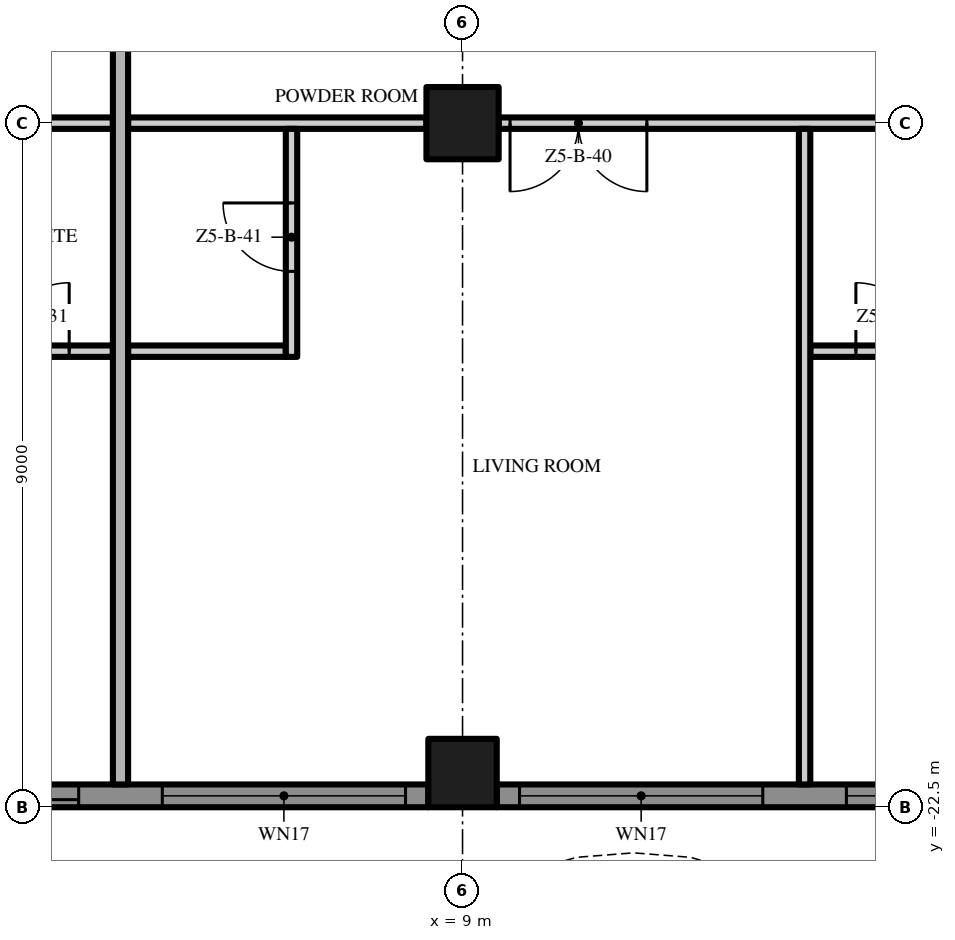
"""IFC4 building model, lengths in metres.
Left out: names, types, materials, properties, quantities, classifications, styles, units other than length and angle.
Written with IfcOpenShell. Run it as: python <this file> out.ifc"""

import sys

from ifc_helpers import new_model, si_unit, direction, frame, frame_2d, origin, origin_2d, place, context, subcontext, project, spatial, polyline, rectangle, outline, extrude, element, fill, save


model = new_model("IFC4")
c1 = context("Model", 3, precision=1e-05, world=origin(), true_north=direction((0.0, 1.0)))
c2 = subcontext(c1, "Body", "Model", "MODEL_VIEW")
j1 = project(units=[si_unit("LENGTHUNIT", "METRE"), si_unit("PLANEANGLEUNIT", "RADIAN")], contexts=[c1])
p1 = place(None, origin())
s1 = spatial("IfcSite", under=j1, at=p1, CompositionType="ELEMENT")
p2 = place(p1, origin())
s2 = spatial("IfcBuilding", under=s1, at=p2, CompositionType="ELEMENT")
p3 = place(p2, frame((0.0, 0.0, 257.8)))
s3 = spatial("IfcBuildingStorey", under=s2, at=p3, CompositionType="ELEMENT", Elevation=257.8)
p4 = place(p3, frame((9.0, -13.5, 0.0), z_axis=(0.0, 0.0, 1.0), x_axis=(1.0, 0.0, 0.0)))
e1 = element("IfcColumn", 1, at=p4, inside=s3, PredefinedType="COLUMN", context=c2, shape_type="SweptSolid", body=[
    extrude(rectangle(XDim=0.95, YDim=0.95, at=origin_2d()), origin(), (0.0, 0.0, 1.0), 3.5),
])
p5 = place(p3, frame((9.0, -22.05, 0.0), z_axis=(0.0, 0.0, 1.0), x_axis=(1.0, 0.0, 0.0)))
e2 = element("IfcColumn", 2, at=p5, inside=s3, PredefinedType="COLUMN", context=c2, shape_type="SweptSolid", body=[
    extrude(rectangle(XDim=0.9, YDim=0.9, at=origin_2d()), origin(), (0.0, 0.0, 1.0), 3.5),
])
p6 = place(p3, frame((8.55, -22.35, 0.0), z_axis=(0.0, 0.0, 1.0), x_axis=(-1.0, 0.0, 0.0)))
e3 = element("IfcWall", 3, at=p6, inside=s3, PredefinedType="SOLIDWALL", context=c2, shape_type="SweptSolid", body=[
    extrude(rectangle(XDim=8.1, YDim=0.3, at=frame_2d((4.05, 0.0))), origin(), (0.0, 0.0, 1.0), 3.5),
])
p7 = place(p6, frame((4.6, 0.0, 0.0)))
e4 = element("IfcOpeningElement", 4, at=p7, cuts=e3, PredefinedType="OPENING", context=c2, shape_type="SweptSolid", body=[
    extrude(rectangle(XDim=3.2, YDim=2.4, at=frame_2d((1.6, 1.2))), frame((0.0, 0.16, 0.0), z_axis=(0.0, -1.0, 0.0), x_axis=(1.0, 0.0, 0.0)), (0.0, 0.0, 1.0), 0.32),
])
p8 = place(p6, frame((0.3, 0.0, 0.45)))
e5 = element("IfcOpeningElement", 5, at=p8, cuts=e3, PredefinedType="OPENING", context=c2, shape_type="SweptSolid", body=[
    extrude(rectangle(XDim=3.2, YDim=2.65, at=frame_2d((1.6, 1.325))), frame((0.0, 0.16, 0.0), z_axis=(0.0, -1.0, 0.0), x_axis=(1.0, 0.0, 0.0)), (0.0, 0.0, 1.0), 0.32),
])
p9 = place(p3, frame((17.55, -22.35, 0.0), z_axis=(0.0, 0.0, 1.0), x_axis=(-1.0, 0.0, 0.0)))
e6 = element("IfcWall", 6, at=p9, inside=s3, PredefinedType="SOLIDWALL", context=c2, shape_type="SweptSolid", body=[
    extrude(rectangle(XDim=8.1, YDim=0.3, at=frame_2d((4.05, 0.0))), origin(), (0.0, 0.0, 1.0), 3.5),
])
p10 = place(p9, frame((4.6, 0.0, 0.45)))
e7 = element("IfcOpeningElement", 7, at=p10, cuts=e6, PredefinedType="OPENING", context=c2, shape_type="SweptSolid", body=[
    extrude(rectangle(XDim=3.2, YDim=2.65, at=frame_2d((1.6, 1.325))), frame((0.0, 0.16, 0.0), z_axis=(0.0, -1.0, 0.0), x_axis=(1.0, 0.0, 0.0)), (0.0, 0.0, 1.0), 0.32),
])
p11 = place(p9, frame((0.3, 0.0, 0.45)))
e8 = element("IfcOpeningElement", 8, at=p11, cuts=e6, PredefinedType="OPENING", context=c2, shape_type="SweptSolid", body=[
    extrude(rectangle(XDim=3.2, YDim=2.65, at=frame_2d((1.6, 1.325))), frame((0.0, 0.16, 0.0), z_axis=(0.0, -1.0, 0.0), x_axis=(1.0, 0.0, 0.0)), (0.0, 0.0, 1.0), 0.32),
])
p12 = place(p3, origin())
e9 = element("IfcWall", 9, at=p12, inside=s3, PredefinedType="USERDEFINED", context=c2, shape_type="SweptSolid", body=[
    extrude(outline(polyline([(-22.5, -24.3), (-21.0, -23.595), (-19.5, -23.159), (-18.75, -23.1), (-18.0, -23.159), (-16.5, -23.595), (-15.0, -24.3), (-13.5, -25.005), (-12.0, -25.441), (-11.25, -25.5), (-10.5, -25.441), (-9.0, -25.005), (-7.5, -24.3), (-6.0, -23.595), (-4.5, -23.159), (-3.75, -23.1), (-3.0, -23.159), (-1.5, -23.595), (0.0, -24.3), (1.5, -25.005), (3.0, -25.441), (3.75, -25.5), (4.5, -25.441), (6.0, -25.005), (7.5, -24.3), (9.0, -23.595), (10.5, -23.159), (11.25, -23.1), (12.0, -23.159), (13.5, -23.595), (15.0, -24.3), (16.5, -25.005), (18.0, -25.441), (18.75, -25.5), (19.5, -25.441), (21.0, -25.005), (22.5, -24.3), (22.394, -24.074), (20.911, -24.771), (19.455, -25.194), (18.75, -25.249), (18.045, -25.194), (16.589, -24.771), (15.106, -24.074), (13.589, -23.36), (12.045, -22.911), (11.25, -22.849), (10.455, -22.911), (8.911, -23.36), (7.394, -24.074), (5.911, -24.771), (4.455, -25.194), (3.75, -25.249), (3.045, -25.194), (1.589, -24.771), (0.106, -24.074), (-1.411, -23.36), (-2.955, -22.911), (-3.75, -22.849), (-4.545, -22.911), (-6.089, -23.36), (-7.606, -24.074), (-9.089, -24.771), (-10.545, -25.194), (-11.25, -25.249), (-11.955, -25.194), (-13.411, -24.771), (-14.894, -24.074), (-16.411, -23.36), (-17.955, -22.911), (-18.75, -22.849), (-19.545, -22.911), (-21.089, -23.36), (-22.606, -24.074), (-22.5, -24.3)])), origin(), (0.0, 0.0, 1.0), 0.9),
])
p13 = place(p3, frame((2.325, -16.5, 0.0), z_axis=(0.0, 0.0, 1.0), x_axis=(1.0, 0.0, 0.0)))
e10 = element("IfcWall", 10, at=p13, inside=s3, PredefinedType="PARTITIONING", context=c2, shape_type="SweptSolid", body=[
    extrude(rectangle(XDim=2.075, YDim=0.15, at=frame_2d((1.038, 0.0))), origin(), (0.0, 0.0, 1.0), 3.5),
])
p14 = place(p13, frame((0.6, 0.0, 0.0)))
e11 = element("IfcOpeningElement", 11, at=p14, cuts=e10, PredefinedType="OPENING", context=c2, shape_type="SweptSolid", body=[
    extrude(rectangle(XDim=0.9, YDim=2.1, at=frame_2d((0.45, 1.05))), frame((0.0, 0.085, 0.0), z_axis=(0.0, -1.0, 0.0), x_axis=(1.0, 0.0, 0.0)), (0.0, 0.0, 1.0), 0.17),
])
p15 = place(p3, frame((4.6, -16.5, 0.0), z_axis=(0.0, 0.0, 1.0), x_axis=(1.0, 0.0, 0.0)))
e12 = element("IfcWall", 12, at=p15, inside=s3, PredefinedType="PARTITIONING", context=c2, shape_type="SweptSolid", body=[
    extrude(rectangle(XDim=2.075, YDim=0.15, at=frame_2d((1.038, 0.0))), origin(), (0.0, 0.0, 1.0), 3.5),
])
p16 = place(p3, frame((13.575, -16.5, 0.0), z_axis=(0.0, 0.0, 1.0), x_axis=(1.0, 0.0, 0.0)))
e13 = element("IfcWall", 13, at=p16, inside=s3, PredefinedType="PARTITIONING", context=c2, shape_type="SweptSolid", body=[
    extrude(rectangle(XDim=2.1, YDim=0.15, at=frame_2d((1.05, 0.0))), origin(), (0.0, 0.0, 1.0), 3.5),
])
p17 = place(p16, frame((0.6, 0.0, 0.0)))
e14 = element("IfcOpeningElement", 14, at=p17, cuts=e13, PredefinedType="OPENING", context=c2, shape_type="SweptSolid", body=[
    extrude(rectangle(XDim=0.9, YDim=2.1, at=frame_2d((0.45, 1.05))), frame((0.0, 0.085, 0.0), z_axis=(0.0, -1.0, 0.0), x_axis=(1.0, 0.0, 0.0)), (0.0, 0.0, 1.0), 0.17),
])
p18 = place(p3, frame((4.4, -13.5, 0.0), z_axis=(0.0, 0.0, 1.0), x_axis=(-1.0, 0.0, 0.0)))
e15 = element("IfcWall", 15, at=p18, inside=s3, PredefinedType="PARTITIONING", context=c2, shape_type="SweptSolid", body=[
    extrude(rectangle(XDim=3.925, YDim=0.15, at=frame_2d((1.962, 0.0))), origin(), (0.0, 0.0, 1.0), 3.5),
])
p19 = place(p18, frame((2.775, 0.0, 0.0)))
e16 = element("IfcOpeningElement", 16, at=p19, cuts=e15, PredefinedType="OPENING", context=c2, shape_type="SweptSolid", body=[
    extrude(rectangle(XDim=1.0, YDim=2.4, at=frame_2d((0.5, 1.2))), frame((0.0, 0.085, 0.0), z_axis=(0.0, -1.0, 0.0), x_axis=(1.0, 0.0, 0.0)), (0.0, 0.0, 1.0), 0.17),
])
p20 = place(p3, frame((4.6, -13.5, 0.0), z_axis=(0.0, 0.0, 1.0), x_axis=(1.0, 0.0, 0.0)))
e17 = element("IfcWall", 17, at=p20, inside=s3, PredefinedType="PARTITIONING", context=c2, shape_type="SweptSolid", body=[
    extrude(rectangle(XDim=3.925, YDim=0.15, at=frame_2d((1.962, 0.0))), origin(), (0.0, 0.0, 1.0), 3.5),
])
p21 = place(p3, frame((17.525, -13.5, 0.0), z_axis=(0.0, 0.0, 1.0), x_axis=(-1.0, 0.0, 0.0)))
e18 = element("IfcWall", 18, at=p21, inside=s3, PredefinedType="PARTITIONING", context=c2, shape_type="SweptSolid", body=[
    extrude(rectangle(XDim=8.05, YDim=0.15, at=frame_2d((4.025, 0.0))), origin(), (0.0, 0.0, 1.0), 3.5),
])
p22 = place(p21, frame((6.1, 0.0, 0.0)))
e19 = element("IfcOpeningElement", 19, at=p22, cuts=e18, PredefinedType="OPENING", context=c2, shape_type="SweptSolid", body=[
    extrude(rectangle(XDim=1.8, YDim=2.4, at=frame_2d((0.9, 1.2))), frame((0.0, 0.085, 0.0), z_axis=(0.0, -1.0, 0.0), x_axis=(1.0, 0.0, 0.0)), (0.0, 0.0, 1.0), 0.17),
])
p23 = place(p21, frame((0.15, 0.0, 0.0)))
e20 = element("IfcOpeningElement", 20, at=p23, cuts=e18, PredefinedType="OPENING", context=c2, shape_type="SweptSolid", body=[
    extrude(rectangle(XDim=1.0, YDim=2.4, at=frame_2d((0.5, 1.2))), frame((0.0, 0.085, 0.0), z_axis=(0.0, -1.0, 0.0), x_axis=(1.0, 0.0, 0.0)), (0.0, 0.0, 1.0), 0.17),
])
p24 = place(p3, frame((4.5, -22.2, 0.0), z_axis=(0.0, 0.0, 1.0), x_axis=(0.0, 1.0, 0.0)))
e21 = element("IfcWall", 21, at=p24, inside=s3, PredefinedType="PARTITIONING", context=c2, shape_type="SweptSolid", body=[
    extrude(rectangle(XDim=22.1, YDim=0.2, at=frame_2d((11.05, 0.0))), origin(), (0.0, 0.0, 1.0), 3.5),
])
p25 = place(p3, frame((6.75, -16.575, 0.0), z_axis=(0.0, 0.0, 1.0), x_axis=(0.0, 1.0, 0.0)))
e22 = element("IfcWall", 22, at=p25, inside=s3, PredefinedType="PARTITIONING", context=c2, shape_type="SweptSolid", body=[
    extrude(rectangle(XDim=3.0, YDim=0.15, at=frame_2d((1.5, 0.0))), origin(), (0.0, 0.0, 1.0), 3.5),
])
p26 = place(p25, frame((1.125, 0.0, 0.0)))
e23 = element("IfcOpeningElement", 23, at=p26, cuts=e22, PredefinedType="OPENING", context=c2, shape_type="SweptSolid", body=[
    extrude(rectangle(XDim=0.9, YDim=2.1, at=frame_2d((0.45, 1.05))), frame((0.0, 0.085, 0.0), z_axis=(0.0, -1.0, 0.0), x_axis=(1.0, 0.0, 0.0)), (0.0, 0.0, 1.0), 0.17),
])
p27 = place(p3, frame((13.5, -22.2, 0.0), z_axis=(0.0, 0.0, 1.0), x_axis=(0.0, 1.0, 0.0)))
e24 = element("IfcWall", 24, at=p27, inside=s3, PredefinedType="PARTITIONING", context=c2, shape_type="SweptSolid", body=[
    extrude(rectangle(XDim=8.625, YDim=0.15, at=frame_2d((4.312, 0.0))), origin(), (0.0, 0.0, 1.0), 3.5),
])
p28 = place(p7, origin())
e25 = element("IfcDoor", 25, at=p28, inside=s3, OperationType="SINGLE_SWING_LEFT", PredefinedType="DOOR", context=c2, shape_type="SweptSolid", body=[
    extrude(rectangle(XDim=3.2, YDim=2.4, at=frame_2d((1.6, 1.2))), frame((0.0, 0.025, 0.0), z_axis=(0.0, -1.0, 0.0), x_axis=(1.0, 0.0, 0.0)), (0.0, 0.0, 1.0), 0.05),
])
fill(e4, e25)
p29 = place(p8, origin())
e26 = element("IfcWindow", 26, at=p29, inside=s3, PartitioningType="SINGLE_PANEL", PredefinedType="WINDOW", context=c2, shape_type="SweptSolid", body=[
    extrude(rectangle(XDim=3.2, YDim=2.65, at=frame_2d((1.6, 1.325))), frame((0.0, 0.03, 0.0), z_axis=(0.0, -1.0, 0.0), x_axis=(1.0, 0.0, 0.0)), (0.0, 0.0, 1.0), 0.06),
])
fill(e5, e26)
p30 = place(p10, origin())
e27 = element("IfcWindow", 27, at=p30, inside=s3, PartitioningType="SINGLE_PANEL", PredefinedType="WINDOW", context=c2, shape_type="SweptSolid", body=[
    extrude(rectangle(XDim=3.2, YDim=2.65, at=frame_2d((1.6, 1.325))), frame((0.0, 0.03, 0.0), z_axis=(0.0, -1.0, 0.0), x_axis=(1.0, 0.0, 0.0)), (0.0, 0.0, 1.0), 0.06),
])
fill(e7, e27)
p31 = place(p11, origin())
e28 = element("IfcWindow", 28, at=p31, inside=s3, PartitioningType="SINGLE_PANEL", PredefinedType="WINDOW", context=c2, shape_type="SweptSolid", body=[
    extrude(rectangle(XDim=3.2, YDim=2.65, at=frame_2d((1.6, 1.325))), frame((0.0, 0.03, 0.0), z_axis=(0.0, -1.0, 0.0), x_axis=(1.0, 0.0, 0.0)), (0.0, 0.0, 1.0), 0.06),
])
fill(e8, e28)
p32 = place(p14, origin())
e29 = element("IfcDoor", 29, at=p32, inside=s3, OperationType="SINGLE_SWING_RIGHT", PredefinedType="DOOR", context=c2, shape_type="SweptSolid", body=[
    extrude(rectangle(XDim=0.9, YDim=2.1, at=frame_2d((0.45, 1.05))), frame((0.0, 0.025, 0.0), z_axis=(0.0, -1.0, 0.0), x_axis=(1.0, 0.0, 0.0)), (0.0, 0.0, 1.0), 0.05),
])
fill(e11, e29)
p33 = place(p22, origin())
e30 = element("IfcDoor", 30, at=p33, inside=s3, OperationType="DOUBLE_DOOR_SINGLE_SWING", PredefinedType="DOOR", context=c2, shape_type="SweptSolid", body=[
    extrude(rectangle(XDim=1.8, YDim=2.4, at=frame_2d((0.9, 1.2))), frame((0.0, 0.025, 0.0), z_axis=(0.0, -1.0, 0.0), x_axis=(1.0, 0.0, 0.0)), (0.0, 0.0, 1.0), 0.05),
])
fill(e19, e30)
p34 = place(p26, origin())
e31 = element("IfcDoor", 31, at=p34, inside=s3, OperationType="SINGLE_SWING_RIGHT", PredefinedType="DOOR", context=c2, shape_type="SweptSolid", body=[
    extrude(rectangle(XDim=0.9, YDim=2.1, at=frame_2d((0.45, 1.05))), frame((0.0, 0.025, 0.0), z_axis=(0.0, -1.0, 0.0), x_axis=(1.0, 0.0, 0.0)), (0.0, 0.0, 1.0), 0.05),
])
fill(e23, e31)
p35 = place(p17, origin())
e32 = element("IfcDoor", 32, at=p35, inside=s3, OperationType="SINGLE_SWING_LEFT", PredefinedType="DOOR", context=c2, shape_type="SweptSolid", body=[
    extrude(rectangle(XDim=0.9, YDim=2.1, at=frame_2d((0.45, 1.05))), frame((0.0, 0.025, 0.0), z_axis=(0.0, -1.0, 0.0), x_axis=(1.0, 0.0, 0.0)), (0.0, 0.0, 1.0), 0.05),
])
fill(e14, e32)
save(model, sys.argv[1])
